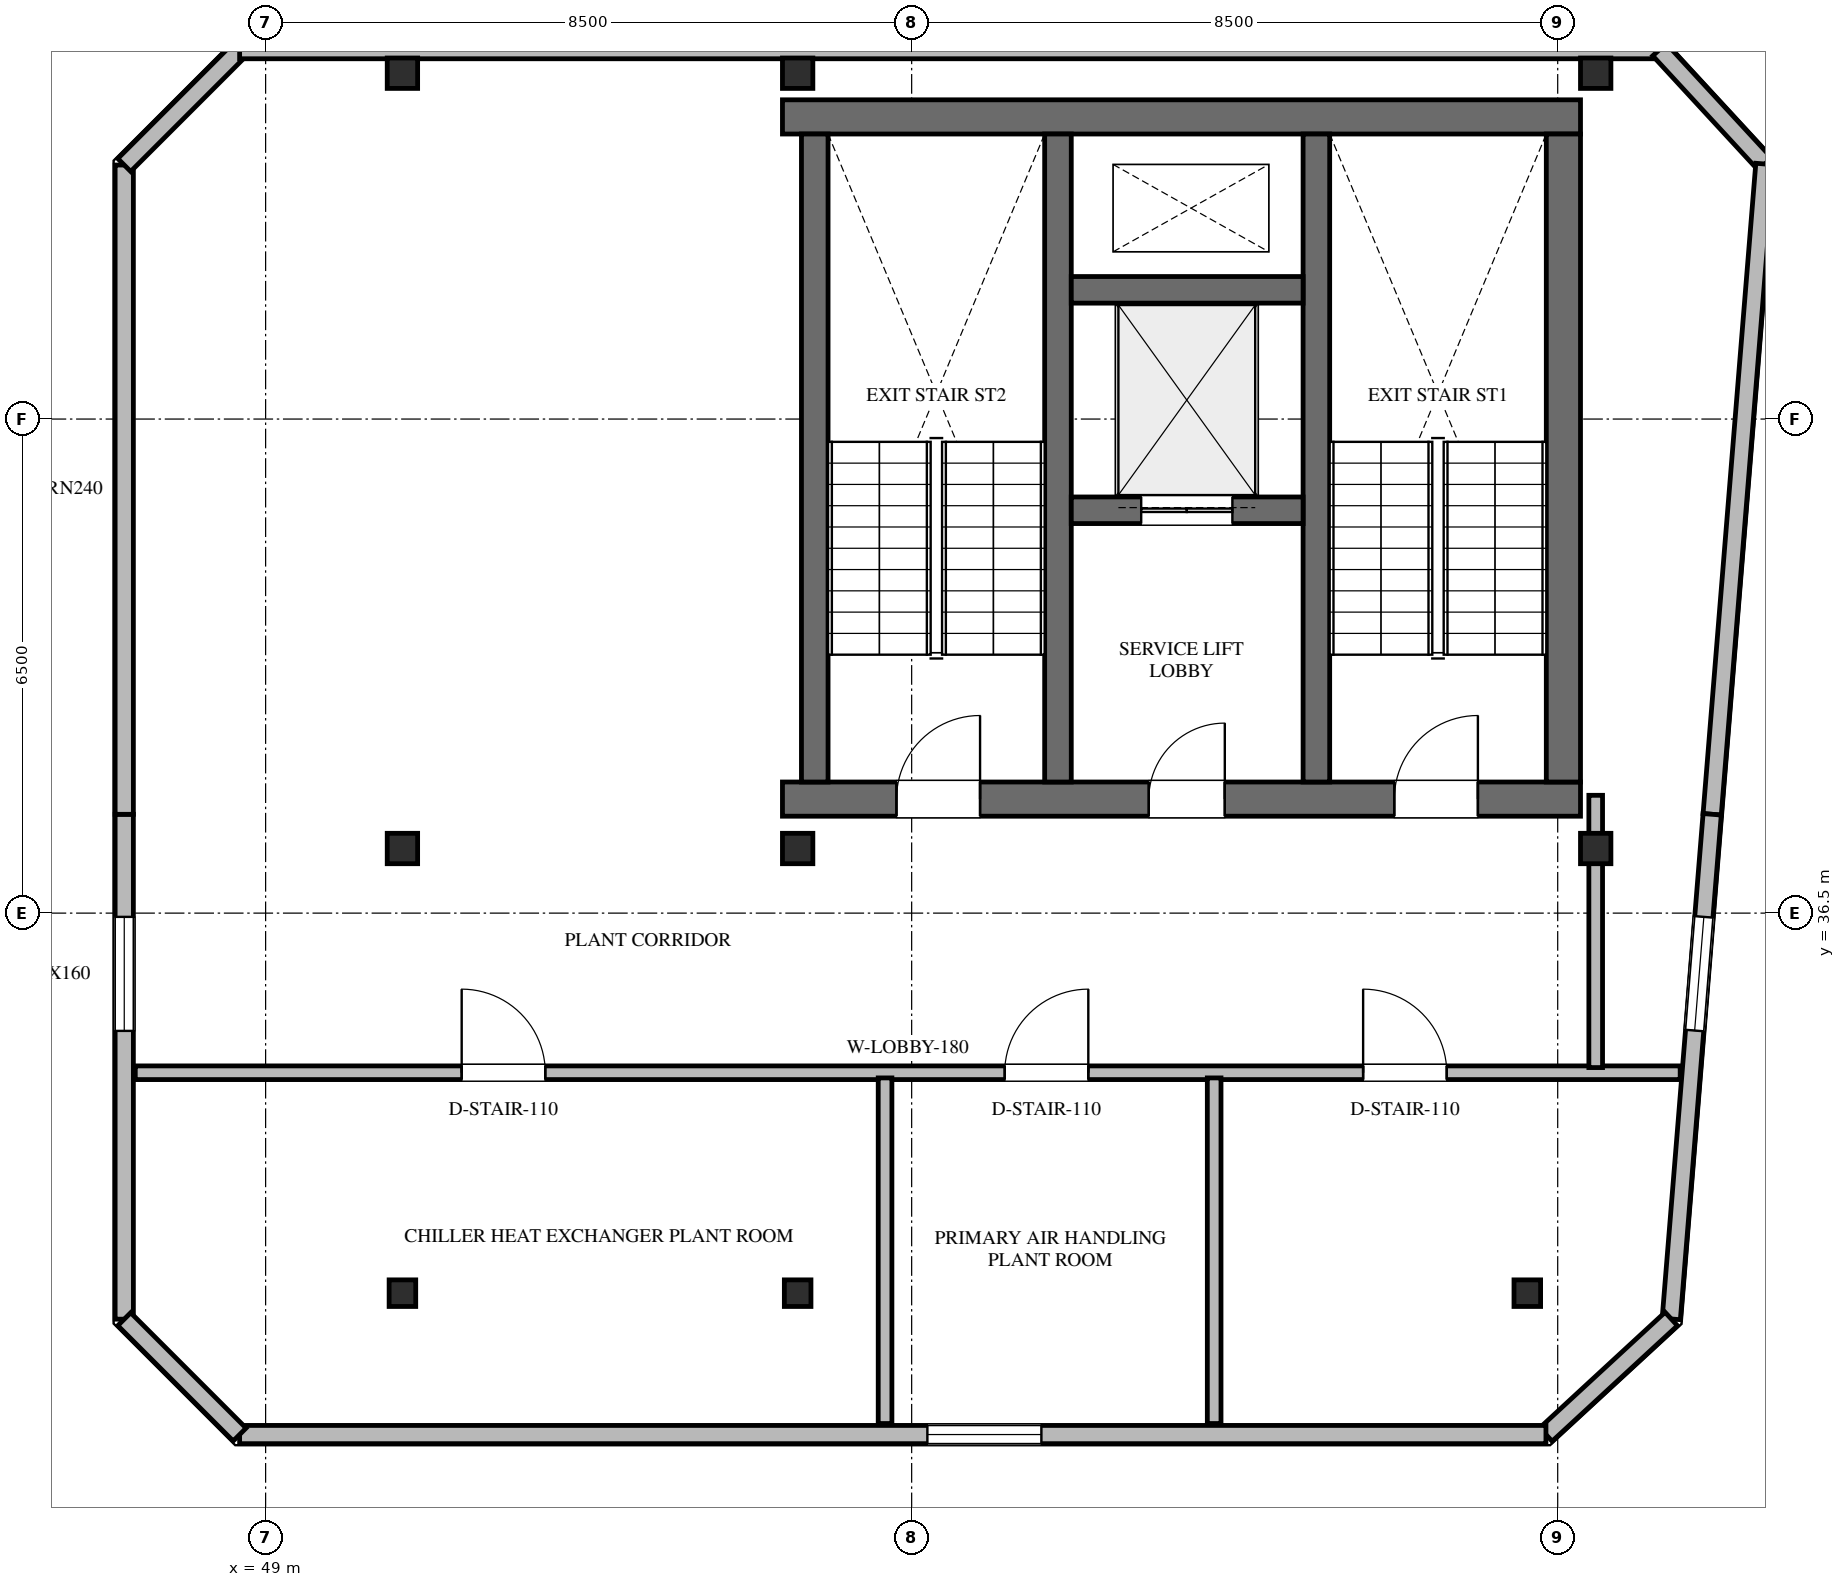
"""IFC4 building model, lengths in metres.
Left out: names, types, materials, properties, quantities, classifications, styles, units other than length and angle.
Written with IfcOpenShell. Run it as: python <this file> out.ifc"""

import sys

from ifc_helpers import new_model, si_unit, direction, frame, frame_2d, origin, origin_2d, place, context, subcontext, project, spatial, rectangle, hollow_rectangle, extrude, element, fill, save


model = new_model("IFC4")
c1 = context("Model", 3, precision=1e-05, world=origin(), true_north=direction((0.0, 1.0)))
c2 = subcontext(c1, "Body", "Model", "MODEL_VIEW")
j1 = project(units=[si_unit("LENGTHUNIT", "METRE"), si_unit("PLANEANGLEUNIT", "RADIAN")], contexts=[c1])
p1 = place(None, origin())
s1 = spatial("IfcSite", under=j1, at=p1, CompositionType="ELEMENT")
p2 = place(p1, origin())
s2 = spatial("IfcBuilding", under=s1, at=p2, CompositionType="ELEMENT")
p3 = place(p2, frame((0.0, 0.0, 326.4)))
s3 = spatial("IfcBuildingStorey", under=s2, at=p3, CompositionType="ELEMENT", Elevation=326.4)
p4 = place(p3, frame((55.8, 46.975, 0.0), z_axis=(0.0, 0.0, 1.0), x_axis=(1.0, 0.0, 0.0)))
e1 = element("IfcWall", 1, at=p4, inside=s3, PredefinedType="SHEAR", context=c2, shape_type="SweptSolid", body=[
    extrude(rectangle(XDim=10.5, YDim=0.45, at=frame_2d((5.25, 0.0))), origin(), (0.0, 0.0, 1.0), 3.6),
])
p5 = place(p3, frame((55.8, 38.0, 0.0), z_axis=(0.0, 0.0, 1.0), x_axis=(1.0, 0.0, 0.0)))
e2 = element("IfcWall", 2, at=p5, inside=s3, PredefinedType="SHEAR", context=c2, shape_type="SweptSolid", body=[
    extrude(rectangle(XDim=10.5, YDim=0.45, at=frame_2d((5.25, 0.0))), origin(), (0.0, 0.0, 1.0), 3.6),
])
p6 = place(p5, frame((1.5, 0.0, 0.0)))
e3 = element("IfcOpeningElement", 3, at=p6, cuts=e2, PredefinedType="OPENING", context=c2, shape_type="SweptSolid", body=[
    extrude(rectangle(XDim=1.1, YDim=2.2, at=frame_2d((0.55, 1.1))), frame((0.0, 0.235, 0.0), z_axis=(0.0, -1.0, 0.0), x_axis=(1.0, 0.0, 0.0)), (0.0, 0.0, 1.0), 0.47),
])
p7 = place(p5, frame((4.82, 0.0, 0.0)))
e4 = element("IfcOpeningElement", 4, at=p7, cuts=e2, PredefinedType="OPENING", context=c2, shape_type="SweptSolid", body=[
    extrude(rectangle(XDim=1.0, YDim=2.15, at=frame_2d((0.5, 1.075))), frame((0.0, 0.235, 0.0), z_axis=(0.0, -1.0, 0.0), x_axis=(1.0, 0.0, 0.0)), (0.0, 0.0, 1.0), 0.47),
])
p8 = place(p5, frame((8.05, 0.0, 0.0)))
e5 = element("IfcOpeningElement", 5, at=p8, cuts=e2, PredefinedType="OPENING", context=c2, shape_type="SweptSolid", body=[
    extrude(rectangle(XDim=1.1, YDim=2.2, at=frame_2d((0.55, 1.1))), frame((0.0, 0.235, 0.0), z_axis=(0.0, -1.0, 0.0), x_axis=(1.0, 0.0, 0.0)), (0.0, 0.0, 1.0), 0.47),
])
p9 = place(p3, frame((66.075, 38.225, 0.0), z_axis=(0.0, 0.0, 1.0), x_axis=(0.0, 1.0, 0.0)))
e6 = element("IfcWall", 6, at=p9, inside=s3, PredefinedType="SHEAR", context=c2, shape_type="SweptSolid", body=[
    extrude(rectangle(XDim=8.525, YDim=0.45, at=frame_2d((4.262, 0.0))), origin(), (0.0, 0.0, 1.0), 3.6),
])
for number, where, z_axis, x_axis in (
    (7, (62.825, 38.225, 0.0), (0.0, 0.0, 1.0), (0.0, 1.0, 0.0)),
    (8, (59.425, 38.225, 0.0), (0.0, 0.0, 1.0), (0.0, 1.0, 0.0)),
    (9, (56.225, 38.225, 0.0), (0.0, 0.0, 1.0), (0.0, 1.0, 0.0)),
):
    element("IfcWall", number, at=place(p3, frame(where, z_axis=z_axis, x_axis=x_axis)), inside=s3, PredefinedType="SHEAR", context=c2, shape_type="SweptSolid", body=[
        extrude(rectangle(XDim=8.525, YDim=0.35, at=frame_2d((4.262, 0.0))), origin(), (0.0, 0.0, 1.0), 3.6),
    ])
p10 = place(p3, frame((59.6, 41.8, 0.0), z_axis=(0.0, 0.0, 1.0), x_axis=(1.0, 0.0, 0.0)))
e10 = element("IfcWall", 10, at=p10, inside=s3, PredefinedType="SHEAR", context=c2, shape_type="SweptSolid", body=[
    extrude(rectangle(XDim=3.05, YDim=0.35, at=frame_2d((1.525, 0.0))), origin(), (0.0, 0.0, 1.0), 3.6),
])
p11 = place(p10, frame((0.92, 0.0, 0.0)))
e11 = element("IfcOpeningElement", 11, at=p11, cuts=e10, PredefinedType="OPENING", context=c2, shape_type="SweptSolid", body=[
    extrude(rectangle(XDim=1.2, YDim=2.2, at=frame_2d((0.6, 1.1))), frame((0.0, 0.185, 0.0), z_axis=(0.0, -1.0, 0.0), x_axis=(1.0, 0.0, 0.0)), (0.0, 0.0, 1.0), 0.37),
])
p12 = place(p3, frame((59.6, 44.7, 0.0), z_axis=(0.0, 0.0, 1.0), x_axis=(1.0, 0.0, 0.0)))
e12 = element("IfcWall", 12, at=p12, inside=s3, PredefinedType="SHEAR", context=c2, shape_type="SweptSolid", body=[
    extrude(rectangle(XDim=3.05, YDim=0.35, at=frame_2d((1.525, 0.0))), origin(), (0.0, 0.0, 1.0), 3.6),
])
for number, where, z_axis, x_axis in (
    (13, (56.0, 31.5, 0.0), (0.0, 0.0, 1.0), (1.0, 0.0, 0.0)),
    (14, (65.6, 31.5, 0.0), (0.0, 0.0, 1.0), (1.0, 0.0, 0.0)),
    (15, (50.8, 31.5, 0.0), (0.0, 0.0, 1.0), (1.0, 0.0, 0.0)),
):
    element("IfcColumn", number, at=place(p3, frame(where, z_axis=z_axis, x_axis=x_axis)), inside=s3, PredefinedType="COLUMN", context=c2, shape_type="SweptSolid", body=[
        extrude(hollow_rectangle(XDim=0.35, YDim=0.35, WallThickness=0.016, at=origin_2d()), origin(), (0.0, 0.0, 1.0), 3.575),
    ])
for number, where, z_axis, x_axis in (
    (16, (66.5, 47.55, 0.0), (0.0, 0.0, 1.0), (1.0, 0.0, 0.0)),
    (17, (56.0, 47.55, 0.0), (0.0, 0.0, 1.0), (1.0, 0.0, 0.0)),
    (18, (66.5, 37.35, 0.0), (0.0, 0.0, 1.0), (1.0, 0.0, 0.0)),
    (19, (56.0, 37.35, 0.0), (0.0, 0.0, 1.0), (1.0, 0.0, 0.0)),
    (20, (50.8, 47.55, 0.0), (0.0, 0.0, 1.0), (1.0, 0.0, 0.0)),
    (21, (50.8, 37.35, 0.0), (0.0, 0.0, 1.0), (1.0, 0.0, 0.0)),
):
    element("IfcColumn", number, at=place(p3, frame(where, z_axis=z_axis, x_axis=x_axis)), inside=s3, PredefinedType="COLUMN", context=c2, shape_type="SweptSolid", body=[
        extrude(hollow_rectangle(XDim=0.4, YDim=0.4, WallThickness=0.016, at=origin_2d()), origin(), (0.0, 0.0, 1.0), 3.6),
    ])
p13 = place(p3, frame((47.14, 31.158, 0.0), z_axis=(0.0, 0.0, 1.0), x_axis=(0.0, 1.0, 0.0)))
e22 = element("IfcWall", 22, at=p13, inside=s3, PredefinedType="STANDARD", context=c2, shape_type="SweptSolid", body=[
    extrude(rectangle(XDim=6.642, YDim=0.24, at=frame_2d((3.321, 0.0))), origin(), (0.0, 0.0, 1.0), 3.32),
])
p14 = place(p13, frame((3.792, 0.0, 0.9)))
e23 = element("IfcOpeningElement", 23, at=p14, cuts=e22, PredefinedType="OPENING", context=c2, shape_type="SweptSolid", body=[
    extrude(rectangle(XDim=1.5, YDim=1.6, at=frame_2d((0.75, 0.8))), frame((0.0, 0.13, 0.0), z_axis=(0.0, -1.0, 0.0), x_axis=(1.0, 0.0, 0.0)), (0.0, 0.0, 1.0), 0.26),
])
p15 = place(p3, frame((47.14, 37.8, 0.0), z_axis=(0.0, 0.0, 1.0), x_axis=(0.0, 1.0, 0.0)))
e24 = element("IfcWall", 24, at=p15, inside=s3, PredefinedType="STANDARD", context=c2, shape_type="SweptSolid", body=[
    extrude(rectangle(XDim=8.542, YDim=0.24, at=frame_2d((4.271, 0.0))), origin(), (0.0, 0.0, 1.0), 3.32),
])
p16 = place(p3, frame((47.14, 46.342, 0.0), z_axis=(0.0, 0.0, 1.0), x_axis=(0.707106781187, 0.707106781187, 0.0)))
e25 = element("IfcWall", 25, at=p16, inside=s3, PredefinedType="STANDARD", context=c2, shape_type="SweptSolid", body=[
    extrude(rectangle(XDim=2.147, YDim=0.24, at=frame_2d((1.073, 0.0))), origin(), (0.0, 0.0, 1.0), 3.32),
])
p17 = place(p3, frame((48.658, 47.86, 0.0), z_axis=(0.0, 0.0, 1.0), x_axis=(1.0, 0.0, 0.0)))
e26 = element("IfcWall", 26, at=p17, inside=s3, PredefinedType="STANDARD", context=c2, shape_type="SweptSolid", body=[
    extrude(rectangle(XDim=18.681, YDim=0.24, at=frame_2d((9.34, 0.0))), origin(), (0.0, 0.0, 1.0), 2.709),
])
p18 = place(p3, frame((67.339, 47.86, 0.0), z_axis=(0.0, 0.0, 1.0), x_axis=(0.677962987297, -0.735096039886, 0.0)))
e27 = element("IfcWall", 27, at=p18, inside=s3, PredefinedType="STANDARD", context=c2, shape_type="SweptSolid", body=[
    extrude(rectangle(XDim=2.047, YDim=0.24, at=frame_2d((1.023, 0.0))), origin(), (0.0, 0.0, 1.0), 3.32),
])
p19 = place(p3, frame((68.726, 46.355, 0.0), z_axis=(0.0, 0.0, 1.0), x_axis=(-0.080834961466, -0.996727499874, 0.0)))
e28 = element("IfcWall", 28, at=p19, inside=s3, PredefinedType="STANDARD", context=c2, shape_type="SweptSolid", body=[
    extrude(rectangle(XDim=8.583, YDim=0.24, at=frame_2d((4.292, 0.0))), origin(), (0.0, 0.0, 1.0), 3.32),
])
p20 = place(p3, frame((68.032, 37.8, 0.0), z_axis=(0.0, 0.0, 1.0), x_axis=(-0.080815868766, -0.996729048115, 0.0)))
e29 = element("IfcWall", 29, at=p20, inside=s3, PredefinedType="STANDARD", context=c2, shape_type="SweptSolid", body=[
    extrude(rectangle(XDim=6.661, YDim=0.24, at=frame_2d((3.331, 0.0))), origin(), (0.0, 0.0, 1.0), 3.32),
])
p21 = place(p20, frame((1.354, 0.0, 0.9)))
e30 = element("IfcOpeningElement", 30, at=p21, cuts=e29, PredefinedType="OPENING", context=c2, shape_type="SweptSolid", body=[
    extrude(rectangle(XDim=1.5, YDim=1.6, at=frame_2d((0.75, 0.8))), frame((0.0, 0.13, 0.0), z_axis=(0.0, -1.0, 0.0), x_axis=(1.0, 0.0, 0.0)), (0.0, 0.0, 1.0), 0.26),
])
p22 = place(p3, frame((67.494, 31.161, 0.0), z_axis=(0.0, 0.0, 1.0), x_axis=(-0.735099639576, -0.677959084234, 0.0)))
e31 = element("IfcWall", 31, at=p22, inside=s3, PredefinedType="STANDARD", context=c2, shape_type="SweptSolid", body=[
    extrude(rectangle(XDim=2.243, YDim=0.24, at=frame_2d((1.122, 0.0))), origin(), (0.0, 0.0, 1.0), 3.32),
])
p23 = place(p3, frame((65.845, 29.64, 0.0), z_axis=(0.0, 0.0, 1.0), x_axis=(-1.0, 0.0, 0.0)))
e32 = element("IfcWall", 32, at=p23, inside=s3, PredefinedType="STANDARD", context=c2, shape_type="SweptSolid", body=[
    extrude(rectangle(XDim=17.187, YDim=0.24, at=frame_2d((8.594, 0.0))), origin(), (0.0, 0.0, 1.0), 3.32),
])
p24 = place(p23, frame((6.638, 0.0, 0.9)))
e33 = element("IfcOpeningElement", 33, at=p24, cuts=e32, PredefinedType="OPENING", context=c2, shape_type="SweptSolid", body=[
    extrude(rectangle(XDim=1.5, YDim=1.6, at=frame_2d((0.75, 0.8))), frame((0.0, 0.13, 0.0), z_axis=(0.0, -1.0, 0.0), x_axis=(1.0, 0.0, 0.0)), (0.0, 0.0, 1.0), 0.26),
])
p25 = place(p3, frame((48.658, 29.64, 0.0), z_axis=(0.0, 0.0, 1.0), x_axis=(-0.707106781187, 0.707106781187, 0.0)))
e34 = element("IfcWall", 34, at=p25, inside=s3, PredefinedType="STANDARD", context=c2, shape_type="SweptSolid", body=[
    extrude(rectangle(XDim=2.147, YDim=0.24, at=frame_2d((1.073, 0.0))), origin(), (0.0, 0.0, 1.0), 3.32),
])
p26 = place(p3, frame((47.285, 34.4, 0.0), z_axis=(0.0, 0.0, 1.0), x_axis=(1.0, 0.0, 0.0)))
e35 = element("IfcWall", 35, at=p26, inside=s3, PredefinedType="STANDARD", context=c2, shape_type="SweptSolid", body=[
    extrude(rectangle(XDim=20.326, YDim=0.18, at=frame_2d((10.163, 0.0))), origin(), (0.0, 0.0, 1.0), 2.709),
])
p27 = place(p26, frame((4.295, 0.0, 0.0)))
e36 = element("IfcOpeningElement", 36, at=p27, cuts=e35, PredefinedType="OPENING", context=c2, shape_type="SweptSolid", body=[
    extrude(rectangle(XDim=1.1, YDim=2.2, at=frame_2d((0.55, 1.1))), frame((0.0, 0.1, 0.0), z_axis=(0.0, -1.0, 0.0), x_axis=(1.0, 0.0, 0.0)), (0.0, 0.0, 1.0), 0.2),
])
p28 = place(p26, frame((11.439, 0.0, 0.0)))
e37 = element("IfcOpeningElement", 37, at=p28, cuts=e35, PredefinedType="OPENING", context=c2, shape_type="SweptSolid", body=[
    extrude(rectangle(XDim=1.1, YDim=2.2, at=frame_2d((0.55, 1.1))), frame((0.0, 0.1, 0.0), z_axis=(0.0, -1.0, 0.0), x_axis=(1.0, 0.0, 0.0)), (0.0, 0.0, 1.0), 0.2),
])
p29 = place(p26, frame((16.155, 0.0, 0.0)))
e38 = element("IfcOpeningElement", 38, at=p29, cuts=e35, PredefinedType="OPENING", context=c2, shape_type="SweptSolid", body=[
    extrude(rectangle(XDim=1.1, YDim=2.2, at=frame_2d((0.55, 1.1))), frame((0.0, 0.1, 0.0), z_axis=(0.0, -1.0, 0.0), x_axis=(1.0, 0.0, 0.0)), (0.0, 0.0, 1.0), 0.2),
])
p30 = place(p3, frame((66.5, 34.468, 0.0), z_axis=(0.0, 0.0, 1.0), x_axis=(0.0, 1.0, 0.0)))
e39 = element("IfcWall", 39, at=p30, inside=s3, PredefinedType="STANDARD", context=c2, shape_type="SweptSolid", body=[
    extrude(rectangle(XDim=3.582, YDim=0.18, at=frame_2d((1.791, 0.0))), origin(), (0.0, 0.0, 1.0), 2.709),
])
for number, where, z_axis, x_axis in (
    (40, (57.15, 29.785, 0.0), (0.0, 0.0, 1.0), (0.0, 1.0, 0.0)),
    (41, (61.48, 29.785, 0.0), (0.0, 0.0, 1.0), (0.0, 1.0, 0.0)),
):
    element("IfcWall", number, at=place(p3, frame(where, z_axis=z_axis, x_axis=x_axis)), inside=s3, PredefinedType="STANDARD", context=c2, shape_type="SweptSolid", body=[
        extrude(rectangle(XDim=4.547, YDim=0.18, at=frame_2d((2.273, 0.0))), origin(), (0.0, 0.0, 1.0), 2.709),
    ])
p31 = place(p14, origin())
e42 = element("IfcWindow", 42, at=p31, inside=s3, PartitioningType="SINGLE_PANEL", PredefinedType="WINDOW", context=c2, shape_type="SweptSolid", body=[
    extrude(rectangle(XDim=1.5, YDim=1.6, at=frame_2d((0.75, 0.8))), frame((0.0, 0.03, 0.0), z_axis=(0.0, -1.0, 0.0), x_axis=(1.0, 0.0, 0.0)), (0.0, 0.0, 1.0), 0.06),
])
fill(e23, e42)
p32 = place(p21, origin())
e43 = element("IfcWindow", 43, at=p32, inside=s3, PartitioningType="SINGLE_PANEL", PredefinedType="WINDOW", context=c2, shape_type="SweptSolid", body=[
    extrude(rectangle(XDim=1.5, YDim=1.6, at=frame_2d((0.75, 0.8))), frame((0.0, 0.03, 0.0), z_axis=(0.0, -1.0, 0.0), x_axis=(1.0, 0.0, 0.0)), (0.0, 0.0, 1.0), 0.06),
])
fill(e30, e43)
p33 = place(p24, origin())
e44 = element("IfcWindow", 44, at=p33, inside=s3, PartitioningType="SINGLE_PANEL", PredefinedType="WINDOW", context=c2, shape_type="SweptSolid", body=[
    extrude(rectangle(XDim=1.5, YDim=1.6, at=frame_2d((0.75, 0.8))), frame((0.0, 0.03, 0.0), z_axis=(0.0, -1.0, 0.0), x_axis=(1.0, 0.0, 0.0)), (0.0, 0.0, 1.0), 0.06),
])
fill(e33, e44)
p34 = place(p6, origin())
e45 = element("IfcDoor", 45, at=p34, inside=s3, OperationType="SINGLE_SWING_RIGHT", PredefinedType="DOOR", context=c2, shape_type="SweptSolid", body=[
    extrude(rectangle(XDim=1.1, YDim=2.2, at=frame_2d((0.55, 1.1))), frame((0.0, 0.025, 0.0), z_axis=(0.0, -1.0, 0.0), x_axis=(1.0, 0.0, 0.0)), (0.0, 0.0, 1.0), 0.05),
])
fill(e3, e45)
p35 = place(p7, origin())
e46 = element("IfcDoor", 46, at=p35, inside=s3, OperationType="SINGLE_SWING_RIGHT", PredefinedType="DOOR", context=c2, shape_type="SweptSolid", body=[
    extrude(rectangle(XDim=1.0, YDim=2.15, at=frame_2d((0.5, 1.075))), frame((0.0, 0.025, 0.0), z_axis=(0.0, -1.0, 0.0), x_axis=(1.0, 0.0, 0.0)), (0.0, 0.0, 1.0), 0.05),
])
fill(e4, e46)
p36 = place(p8, origin())
e47 = element("IfcDoor", 47, at=p36, inside=s3, OperationType="SINGLE_SWING_RIGHT", PredefinedType="DOOR", context=c2, shape_type="SweptSolid", body=[
    extrude(rectangle(XDim=1.1, YDim=2.2, at=frame_2d((0.55, 1.1))), frame((0.0, 0.025, 0.0), z_axis=(0.0, -1.0, 0.0), x_axis=(1.0, 0.0, 0.0)), (0.0, 0.0, 1.0), 0.05),
])
fill(e5, e47)
p37 = place(p11, origin())
e48 = element("IfcDoor", 48, at=p37, inside=s3, OperationType="DOUBLE_DOOR_SLIDING", PredefinedType="DOOR", context=c2, shape_type="SweptSolid", body=[
    extrude(rectangle(XDim=1.2, YDim=2.2, at=frame_2d((0.6, 1.1))), frame((0.0, 0.025, 0.0), z_axis=(0.0, -1.0, 0.0), x_axis=(1.0, 0.0, 0.0)), (0.0, 0.0, 1.0), 0.05),
])
fill(e11, e48)
p38 = place(p27, origin())
e49 = element("IfcDoor", 49, at=p38, inside=s3, OperationType="SINGLE_SWING_LEFT", PredefinedType="DOOR", context=c2, shape_type="SweptSolid", body=[
    extrude(rectangle(XDim=1.1, YDim=2.2, at=frame_2d((0.55, 1.1))), frame((0.0, 0.025, 0.0), z_axis=(0.0, -1.0, 0.0), x_axis=(1.0, 0.0, 0.0)), (0.0, 0.0, 1.0), 0.05),
])
fill(e36, e49)
p39 = place(p28, origin())
e50 = element("IfcDoor", 50, at=p39, inside=s3, OperationType="SINGLE_SWING_RIGHT", PredefinedType="DOOR", context=c2, shape_type="SweptSolid", body=[
    extrude(rectangle(XDim=1.1, YDim=2.2, at=frame_2d((0.55, 1.1))), frame((0.0, 0.025, 0.0), z_axis=(0.0, -1.0, 0.0), x_axis=(1.0, 0.0, 0.0)), (0.0, 0.0, 1.0), 0.05),
])
fill(e37, e50)
p40 = place(p29, origin())
e51 = element("IfcDoor", 51, at=p40, inside=s3, OperationType="SINGLE_SWING_LEFT", PredefinedType="DOOR", context=c2, shape_type="SweptSolid", body=[
    extrude(rectangle(XDim=1.1, YDim=2.2, at=frame_2d((0.55, 1.1))), frame((0.0, 0.025, 0.0), z_axis=(0.0, -1.0, 0.0), x_axis=(1.0, 0.0, 0.0)), (0.0, 0.0, 1.0), 0.05),
])
fill(e38, e51)
save(model, sys.argv[1])
